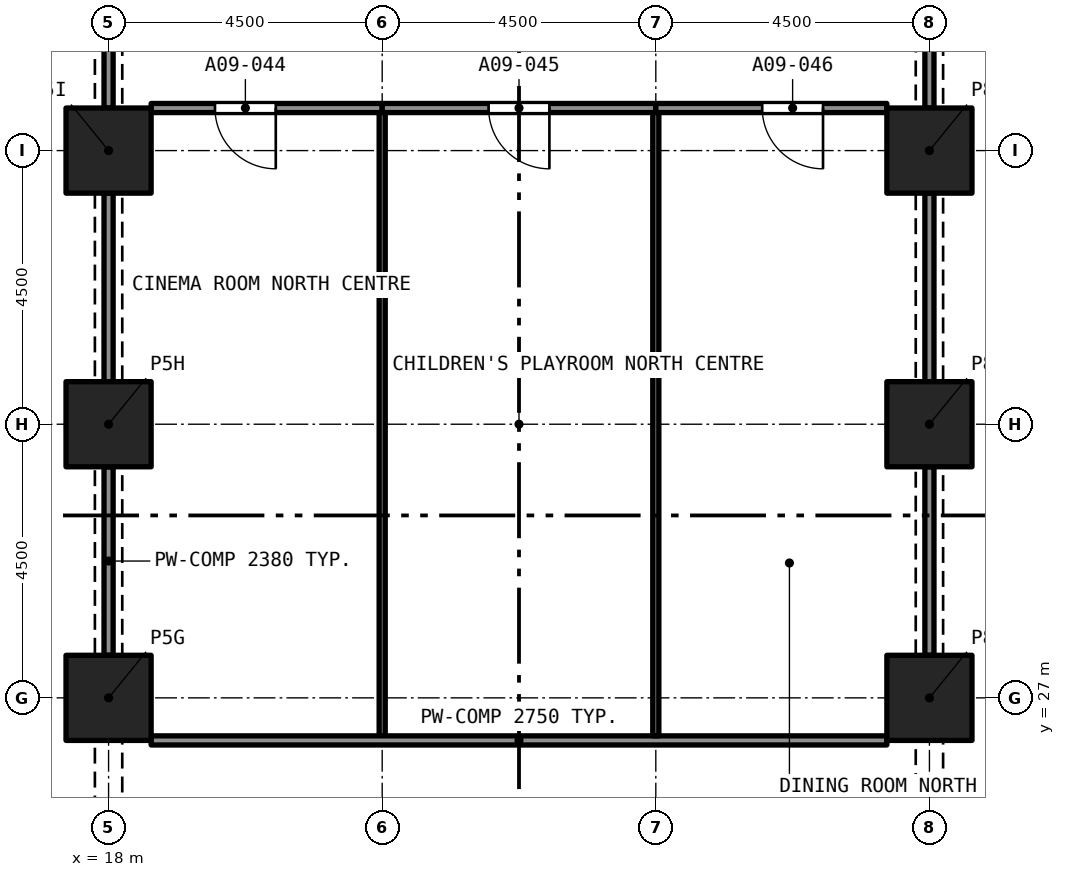
"""IFC4 building model, lengths in metres.
Left out: names, types, materials, properties, quantities, classifications, styles, units other than length and angle.
Written with IfcOpenShell. Run it as: python <this file> out.ifc"""

import sys

from ifc_helpers import new_model, si_unit, direction, frame, frame_2d, origin, origin_2d, place, context, subcontext, project, spatial, rectangle, extrude, element, fill, save


model = new_model("IFC4")
c1 = context("Model", 3, precision=1e-05, world=origin(), true_north=direction((0.0, 1.0)))
c2 = subcontext(c1, "Body", "Model", "MODEL_VIEW")
j1 = project(units=[si_unit("LENGTHUNIT", "METRE"), si_unit("PLANEANGLEUNIT", "RADIAN")], contexts=[c1])
p1 = place(None, origin())
s1 = spatial("IfcSite", under=j1, at=p1, CompositionType="ELEMENT")
p2 = place(p1, origin())
s2 = spatial("IfcBuilding", under=s1, at=p2, CompositionType="ELEMENT")
p3 = place(p2, frame((0.0, 0.0, 40.0)))
s3 = spatial("IfcBuildingStorey", under=s2, at=p3, CompositionType="ELEMENT", Elevation=40.0)
for number, where, z_axis, x_axis in (
    (1, (18.0, 27.0, 0.0), (0.0, 0.0, 1.0), (1.0, 0.0, 0.0)),
    (2, (31.5, 27.0, 0.0), (0.0, 0.0, 1.0), (1.0, 0.0, 0.0)),
    (3, (18.0, 31.5, 0.0), (0.0, 0.0, 1.0), (1.0, 0.0, 0.0)),
    (4, (31.5, 31.5, 0.0), (0.0, 0.0, 1.0), (1.0, 0.0, 0.0)),
    (5, (18.0, 36.0, 0.0), (0.0, 0.0, 1.0), (1.0, 0.0, 0.0)),
    (6, (31.5, 36.0, 0.0), (0.0, 0.0, 1.0), (1.0, 0.0, 0.0)),
):
    element("IfcColumn", number, at=place(p3, frame(where, z_axis=z_axis, x_axis=x_axis)), inside=s3, PredefinedType="COLUMN", context=c2, shape_type="SweptSolid", body=[
        extrude(rectangle(XDim=1.4, YDim=1.4, at=origin_2d()), origin(), (0.0, 0.0, 1.0), 3.2),
    ])
p4 = place(p3, frame((22.5, 36.7, 0.0), z_axis=(0.0, 0.0, 1.0), x_axis=(-1.0, 0.0, 0.0)))
e7 = element("IfcWall", 7, at=p4, inside=s3, PredefinedType="PARTITIONING", context=c2, shape_type="SweptSolid", body=[
    extrude(rectangle(XDim=3.8, YDim=0.15, at=frame_2d((1.9, 0.0))), origin(), (0.0, 0.0, 1.0), 2.75),
])
p5 = place(p4, frame((1.75, 0.0, 0.0)))
e8 = element("IfcOpeningElement", 8, at=p5, cuts=e7, PredefinedType="OPENING", context=c2, shape_type="SweptSolid", body=[
    extrude(rectangle(XDim=1.0, YDim=2.1, at=frame_2d((0.5, 1.05))), frame((0.0, 0.085, 0.0), z_axis=(0.0, -1.0, 0.0), x_axis=(1.0, 0.0, 0.0)), (0.0, 0.0, 1.0), 0.17),
])
p6 = place(p3, frame((27.0, 36.7, 0.0), z_axis=(0.0, 0.0, 1.0), x_axis=(-1.0, 0.0, 0.0)))
e9 = element("IfcWall", 9, at=p6, inside=s3, PredefinedType="PARTITIONING", context=c2, shape_type="SweptSolid", body=[
    extrude(rectangle(XDim=4.5, YDim=0.15, at=frame_2d((2.25, 0.0))), origin(), (0.0, 0.0, 1.0), 2.75),
])
p7 = place(p6, frame((1.75, 0.0, 0.0)))
e10 = element("IfcOpeningElement", 10, at=p7, cuts=e9, PredefinedType="OPENING", context=c2, shape_type="SweptSolid", body=[
    extrude(rectangle(XDim=1.0, YDim=2.1, at=frame_2d((0.5, 1.05))), frame((0.0, 0.085, 0.0), z_axis=(0.0, -1.0, 0.0), x_axis=(1.0, 0.0, 0.0)), (0.0, 0.0, 1.0), 0.17),
])
p8 = place(p3, frame((30.8, 36.7, 0.0), z_axis=(0.0, 0.0, 1.0), x_axis=(-1.0, 0.0, 0.0)))
e11 = element("IfcWall", 11, at=p8, inside=s3, PredefinedType="PARTITIONING", context=c2, shape_type="SweptSolid", body=[
    extrude(rectangle(XDim=3.8, YDim=0.15, at=frame_2d((1.9, 0.0))), origin(), (0.0, 0.0, 1.0), 2.75),
])
p9 = place(p8, frame((1.05, 0.0, 0.0)))
e12 = element("IfcOpeningElement", 12, at=p9, cuts=e11, PredefinedType="OPENING", context=c2, shape_type="SweptSolid", body=[
    extrude(rectangle(XDim=1.0, YDim=2.1, at=frame_2d((0.5, 1.05))), frame((0.0, 0.085, 0.0), z_axis=(0.0, -1.0, 0.0), x_axis=(1.0, 0.0, 0.0)), (0.0, 0.0, 1.0), 0.17),
])
p10 = place(p3, frame((31.5, 36.7, 0.0), z_axis=(0.0, 0.0, 1.0), x_axis=(0.0, 1.0, 0.0)))
e13 = element("IfcWall", 13, at=p10, inside=s3, PredefinedType="PARTITIONING", context=c2, shape_type="SweptSolid", body=[
    extrude(rectangle(XDim=3.1, YDim=0.15, at=frame_2d((1.55, 0.0))), origin(), (0.0, 0.0, 1.0), 2.38),
])
p11 = place(p10, frame((0.95, 0.0, 0.0)))
e14 = element("IfcOpeningElement", 14, at=p11, cuts=e13, PredefinedType="OPENING", context=c2, shape_type="SweptSolid", body=[
    extrude(rectangle(XDim=1.2, YDim=2.1, at=frame_2d((0.6, 1.05))), frame((0.0, 0.085, 0.0), z_axis=(0.0, -1.0, 0.0), x_axis=(1.0, 0.0, 0.0)), (0.0, 0.0, 1.0), 0.17),
])
p12 = place(p3, frame((18.0, 39.8, 0.0), z_axis=(0.0, 0.0, 1.0), x_axis=(0.0, -1.0, 0.0)))
e15 = element("IfcWall", 15, at=p12, inside=s3, PredefinedType="PARTITIONING", context=c2, shape_type="SweptSolid", body=[
    extrude(rectangle(XDim=3.1, YDim=0.15, at=frame_2d((1.55, 0.0))), origin(), (0.0, 0.0, 1.0), 2.38),
])
p13 = place(p12, frame((0.95, 0.0, 0.0)))
e16 = element("IfcOpeningElement", 16, at=p13, cuts=e15, PredefinedType="OPENING", context=c2, shape_type="SweptSolid", body=[
    extrude(rectangle(XDim=1.2, YDim=2.1, at=frame_2d((0.6, 1.05))), frame((0.0, 0.085, 0.0), z_axis=(0.0, -1.0, 0.0), x_axis=(1.0, 0.0, 0.0)), (0.0, 0.0, 1.0), 0.17),
])
p14 = place(p3, frame((22.5, 26.375, 0.0), z_axis=(0.0, 0.0, 1.0), x_axis=(0.0, 1.0, 0.0)))
e17 = element("IfcWall", 17, at=p14, inside=s3, PredefinedType="PARTITIONING", context=c2, shape_type="SweptSolid", body=[
    extrude(rectangle(XDim=10.25, YDim=0.1, at=frame_2d((5.125, 0.0))), origin(), (0.0, 0.0, 1.0), 2.75),
])
for number, where, z_axis, x_axis in (
    (18, (18.0, 27.7, 0.0), (0.0, 0.0, 1.0), (0.0, 1.0, 0.0)),
    (19, (18.0, 32.2, 0.0), (0.0, 0.0, 1.0), (0.0, 1.0, 0.0)),
):
    element("IfcWall", number, at=place(p3, frame(where, z_axis=z_axis, x_axis=x_axis)), inside=s3, PredefinedType="PARTITIONING", context=c2, shape_type="SweptSolid", body=[
        extrude(rectangle(XDim=3.1, YDim=0.15, at=frame_2d((1.55, 0.0))), origin(), (0.0, 0.0, 1.0), 2.38),
    ])
p15 = place(p3, frame((18.7, 26.3, 0.0), z_axis=(0.0, 0.0, 1.0), x_axis=(1.0, 0.0, 0.0)))
e20 = element("IfcWall", 20, at=p15, inside=s3, PredefinedType="PARTITIONING", context=c2, shape_type="SweptSolid", body=[
    extrude(rectangle(XDim=12.1, YDim=0.15, at=frame_2d((6.05, 0.0))), origin(), (0.0, 0.0, 1.0), 2.75),
])
p16 = place(p3, frame((27.0, 26.375, 0.0), z_axis=(0.0, 0.0, 1.0), x_axis=(0.0, 1.0, 0.0)))
e21 = element("IfcWall", 21, at=p16, inside=s3, PredefinedType="PARTITIONING", context=c2, shape_type="SweptSolid", body=[
    extrude(rectangle(XDim=10.25, YDim=0.1, at=frame_2d((5.125, 0.0))), origin(), (0.0, 0.0, 1.0), 2.75),
])
for number, where, z_axis, x_axis in (
    (22, (31.5, 32.2, 0.0), (0.0, 0.0, 1.0), (0.0, 1.0, 0.0)),
    (23, (31.5, 27.7, 0.0), (0.0, 0.0, 1.0), (0.0, 1.0, 0.0)),
):
    element("IfcWall", number, at=place(p3, frame(where, z_axis=z_axis, x_axis=x_axis)), inside=s3, PredefinedType="PARTITIONING", context=c2, shape_type="SweptSolid", body=[
        extrude(rectangle(XDim=3.1, YDim=0.15, at=frame_2d((1.55, 0.0))), origin(), (0.0, 0.0, 1.0), 2.38),
    ])
p17 = place(p5, origin())
e24 = element("IfcDoor", 24, at=p17, inside=s3, OperationType="SINGLE_SWING_RIGHT", PredefinedType="DOOR", context=c2, shape_type="SweptSolid", body=[
    extrude(rectangle(XDim=1.0, YDim=2.1, at=frame_2d((0.5, 1.05))), frame((0.0, 0.025, 0.0), z_axis=(0.0, -1.0, 0.0), x_axis=(1.0, 0.0, 0.0)), (0.0, 0.0, 1.0), 0.05),
])
fill(e8, e24)
p18 = place(p7, origin())
e25 = element("IfcDoor", 25, at=p18, inside=s3, OperationType="SINGLE_SWING_RIGHT", PredefinedType="DOOR", context=c2, shape_type="SweptSolid", body=[
    extrude(rectangle(XDim=1.0, YDim=2.1, at=frame_2d((0.5, 1.05))), frame((0.0, 0.025, 0.0), z_axis=(0.0, -1.0, 0.0), x_axis=(1.0, 0.0, 0.0)), (0.0, 0.0, 1.0), 0.05),
])
fill(e10, e25)
p19 = place(p9, origin())
e26 = element("IfcDoor", 26, at=p19, inside=s3, OperationType="SINGLE_SWING_LEFT", PredefinedType="DOOR", context=c2, shape_type="SweptSolid", body=[
    extrude(rectangle(XDim=1.0, YDim=2.1, at=frame_2d((0.5, 1.05))), frame((0.0, 0.025, 0.0), z_axis=(0.0, -1.0, 0.0), x_axis=(1.0, 0.0, 0.0)), (0.0, 0.0, 1.0), 0.05),
])
fill(e12, e26)
save(model, sys.argv[1])
